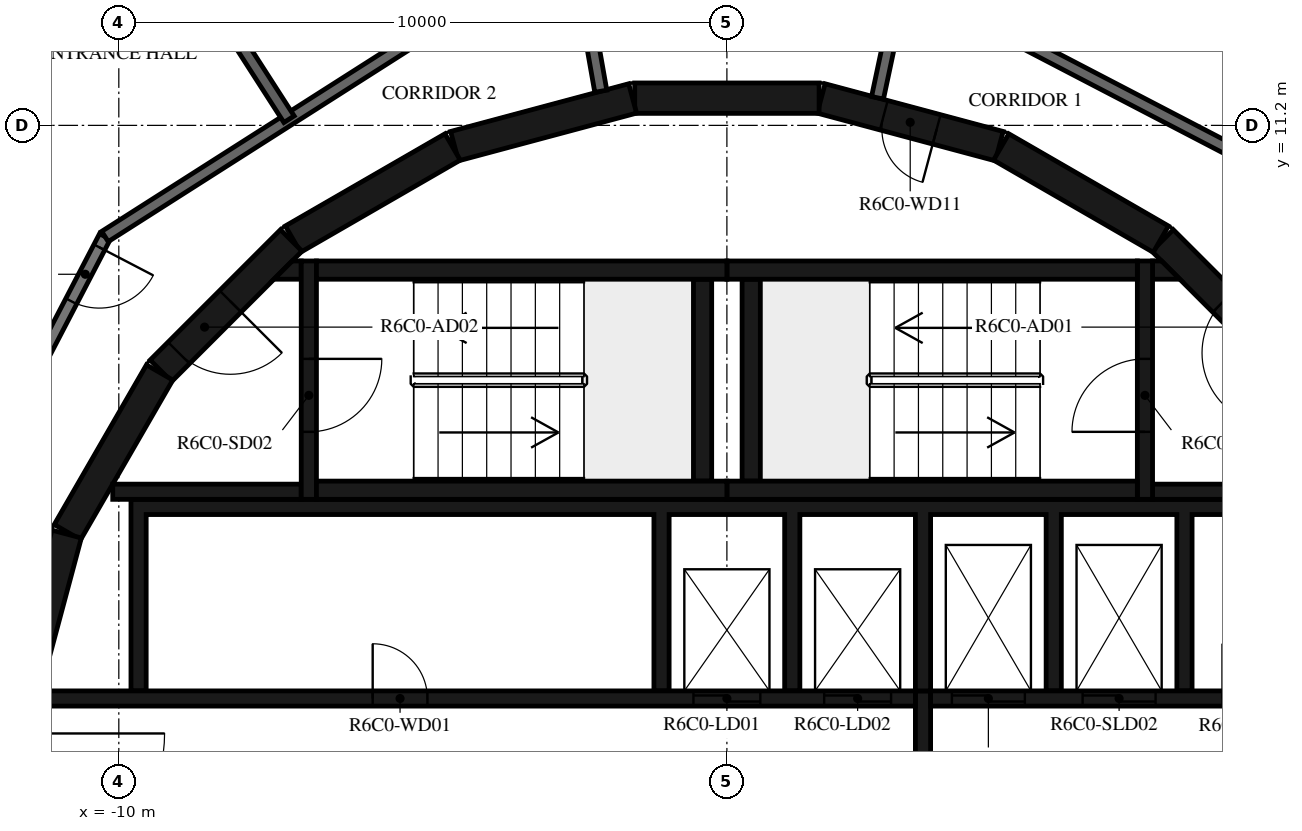
"""IFC4 building model, lengths in metres.
Left out: names, types, materials, properties, quantities, classifications, styles, units other than length and angle.
Written with IfcOpenShell. Run it as: python <this file> out.ifc"""

import sys

from ifc_helpers import new_model, si_unit, direction, frame, frame_2d, origin, place, context, subcontext, project, spatial, polyline, rectangle, outline, extrude, element, fill, save


model = new_model("IFC4")
c1 = context("Model", 3, precision=1e-05, world=origin(), true_north=direction((0.0, 1.0)))
c2 = subcontext(c1, "Body", "Model", "MODEL_VIEW")
j1 = project(units=[si_unit("LENGTHUNIT", "METRE"), si_unit("PLANEANGLEUNIT", "RADIAN")], contexts=[c1])
p1 = place(None, origin())
s1 = spatial("IfcSite", under=j1, at=p1, CompositionType="ELEMENT")
p2 = place(p1, origin())
s2 = spatial("IfcBuilding", under=s1, at=p2, CompositionType="ELEMENT")
p3 = place(p2, frame((0.0, 0.0, 254.7)))
s3 = spatial("IfcBuildingStorey", under=s2, at=p3, CompositionType="ELEMENT", Elevation=254.7)
p4 = place(p3, frame((9.308, 7.164, 0.0), z_axis=(0.0, 0.0, 1.0), x_axis=(-0.707106781187, 0.707106781187, 0.0)))
e1 = element("IfcWall", 1, at=p4, inside=s3, PredefinedType="SHEAR", context=c2, shape_type="SweptSolid", body=[
    extrude(rectangle(XDim=3.032, YDim=0.5, at=frame_2d((1.516, 0.0))), origin(), (0.0, 0.0, 1.0), 3.05),
])
p5 = place(p4, frame((0.416, 0.0, 0.0)))
e2 = element("IfcOpeningElement", 2, at=p5, cuts=e1, PredefinedType="OPENING", context=c2, shape_type="SweptSolid", body=[
    extrude(rectangle(XDim=1.2, YDim=2.1, at=frame_2d((0.6, 1.05))), frame((0.0, 0.26, 0.0), z_axis=(0.0, -1.0, 0.0), x_axis=(1.0, 0.0, 0.0)), (0.0, 0.0, 1.0), 0.52),
])
p6 = place(p3, frame((7.137, 9.329, 0.0), z_axis=(0.0, 0.0, 1.0), x_axis=(-0.865975092491, 0.500087131594, 0.0)))
e3 = element("IfcWall", 3, at=p6, inside=s3, PredefinedType="SHEAR", context=c2, shape_type="SweptSolid", body=[
    extrude(rectangle(XDim=3.033, YDim=0.5, at=frame_2d((1.516, 0.0))), origin(), (0.0, 0.0, 1.0), 3.05),
])
p7 = place(p3, frame((4.479, 10.858, 0.0), z_axis=(0.0, 0.0, 1.0), x_axis=(-0.965948410781, 0.258734743916, 0.0)))
e4 = element("IfcWall", 4, at=p7, inside=s3, PredefinedType="SHEAR", context=c2, shape_type="SweptSolid", body=[
    extrude(rectangle(XDim=3.033, YDim=0.5, at=frame_2d((1.516, 0.0))), origin(), (0.0, 0.0, 1.0), 3.05),
])
p8 = place(p7, frame((1.066, 0.0, 0.0)))
e5 = element("IfcOpeningElement", 5, at=p8, cuts=e4, PredefinedType="OPENING", context=c2, shape_type="SweptSolid", body=[
    extrude(rectangle(XDim=0.9, YDim=2.1, at=frame_2d((0.45, 1.05))), frame((0.0, 0.26, 0.0), z_axis=(0.0, -1.0, 0.0), x_axis=(1.0, 0.0, 0.0)), (0.0, 0.0, 1.0), 0.52),
])
for number, where, z_axis, x_axis in (
    (6, (1.516, 11.647, 0.0), (0.0, 0.0, 1.0), (-1.0, 0.0, 0.0)),
    (7, (-1.55, 11.643, 0.0), (0.0, 0.0, 1.0), (-0.966, -0.259, 0.0)),
    (8, (-4.51, 10.845, 0.0), (0.0, 0.0, 1.0), (-0.866, -0.5, 0.0)),
):
    element("IfcWall", number, at=place(p3, frame(where, z_axis=z_axis, x_axis=x_axis)), inside=s3, PredefinedType="SHEAR", context=c2, shape_type="SweptSolid", body=[
        extrude(rectangle(XDim=3.033, YDim=0.5, at=frame_2d((1.516, 0.0))), origin(), (0.0, 0.0, 1.0), 3.05),
    ])
p9 = place(p3, frame((-7.164, 9.308, 0.0), z_axis=(0.0, 0.0, 1.0), x_axis=(-0.707106781187, -0.707106781187, 0.0)))
e9 = element("IfcWall", 9, at=p9, inside=s3, PredefinedType="SHEAR", context=c2, shape_type="SweptSolid", body=[
    extrude(rectangle(XDim=3.032, YDim=0.5, at=frame_2d((1.516, 0.0))), origin(), (0.0, 0.0, 1.0), 3.05),
])
p10 = place(p9, frame((1.416, 0.0, 0.0)))
e10 = element("IfcOpeningElement", 10, at=p10, cuts=e9, PredefinedType="OPENING", context=c2, shape_type="SweptSolid", body=[
    extrude(rectangle(XDim=1.2, YDim=2.1, at=frame_2d((0.6, 1.05))), frame((0.0, 0.26, 0.0), z_axis=(0.0, -1.0, 0.0), x_axis=(1.0, 0.0, 0.0)), (0.0, 0.0, 1.0), 0.52),
])
for number, where, z_axis, x_axis in (
    (11, (-9.329, 7.137, 0.0), (0.0, 0.0, 1.0), (-0.5, -0.866, 0.0)),
    (12, (-10.858, 4.479, 0.0), (0.0, 0.0, 1.0), (-0.259, -0.966, 0.0)),
):
    element("IfcWall", number, at=place(p3, frame(where, z_axis=z_axis, x_axis=x_axis)), inside=s3, PredefinedType="SHEAR", context=c2, shape_type="SweptSolid", body=[
        extrude(rectangle(XDim=3.033, YDim=0.5, at=frame_2d((1.516, 0.0))), origin(), (0.0, 0.0, 1.0), 3.05),
    ])
for number, where, z_axis, x_axis in (
    (13, (0.0, 5.2, 0.0), (0.0, 0.0, 1.0), (1.0, 0.0, 0.0)),
    (14, (0.0, 8.82, 0.0), (0.0, 0.0, 1.0), (1.0, 0.0, 0.0)),
):
    element("IfcWall", number, at=place(p3, frame(where, z_axis=z_axis, x_axis=x_axis)), inside=s3, PredefinedType="SHEAR", context=c2, shape_type="SweptSolid", body=[
        extrude(rectangle(XDim=6.75, YDim=0.3, at=frame_2d((3.375, 0.0))), origin(), (0.0, 0.0, 1.0), 3.05),
    ])
p11 = place(p3, frame((0.4, 5.35, 0.0), z_axis=(0.0, 0.0, 1.0), x_axis=(0.0, 1.0, 0.0)))
e15 = element("IfcWall", 15, at=p11, inside=s3, PredefinedType="SHEAR", context=c2, shape_type="SweptSolid", body=[
    extrude(rectangle(XDim=3.32, YDim=0.3, at=frame_2d((1.66, 0.0))), origin(), (0.0, 0.0, 1.0), 3.05),
])
p12 = place(p3, frame((6.875, 5.05, 0.0), z_axis=(0.0, 0.0, 1.0), x_axis=(0.0, 1.0, 0.0)))
e16 = element("IfcWall", 16, at=p12, inside=s3, PredefinedType="SHEAR", context=c2, shape_type="SweptSolid", body=[
    extrude(rectangle(XDim=3.92, YDim=0.25, at=frame_2d((1.96, 0.0))), origin(), (0.0, 0.0, 1.0), 3.05),
])
p13 = place(p12, frame((1.11, 0.0, 0.0)))
e17 = element("IfcOpeningElement", 17, at=p13, cuts=e16, PredefinedType="OPENING", context=c2, shape_type="SweptSolid", body=[
    extrude(rectangle(XDim=1.2, YDim=2.1, at=frame_2d((0.6, 1.05))), frame((0.0, 0.135, 0.0), z_axis=(0.0, -1.0, 0.0), x_axis=(1.0, 0.0, 0.0)), (0.0, 0.0, 1.0), 0.27),
])
p14 = place(p3, frame((7.0, 5.175, 0.0), z_axis=(0.0, 0.0, 1.0), x_axis=(1.0, 0.0, 0.0)))
e18 = element("IfcWall", 18, at=p14, inside=s3, PredefinedType="SHEAR", context=c2, shape_type="SweptSolid", body=[
    extrude(rectangle(XDim=3.1, YDim=0.25, at=frame_2d((1.55, 0.0))), origin(), (0.0, 0.0, 1.0), 3.05),
])
p15 = place(p3, origin())
e19 = element("IfcWall", 19, at=p15, inside=s3, PredefinedType="SHEAR", context=c2, shape_type="SweptSolid", body=[
    extrude(outline(polyline([(7.448, 8.67), (7.0, 8.67), (7.0, 8.97), (7.148, 8.97), (7.448, 8.67)])), origin(), (0.0, 0.0, 1.0), 3.05),
])
for number, where, z_axis, x_axis in (
    (20, (-6.75, 5.2, 0.0), (0.0, 0.0, 1.0), (1.0, 0.0, 0.0)),
    (21, (-6.75, 8.82, 0.0), (0.0, 0.0, 1.0), (1.0, 0.0, 0.0)),
):
    element("IfcWall", number, at=place(p3, frame(where, z_axis=z_axis, x_axis=x_axis)), inside=s3, PredefinedType="SHEAR", context=c2, shape_type="SweptSolid", body=[
        extrude(rectangle(XDim=6.75, YDim=0.3, at=frame_2d((3.375, 0.0))), origin(), (0.0, 0.0, 1.0), 3.05),
    ])
p16 = place(p3, frame((-0.4, 5.35, 0.0), z_axis=(0.0, 0.0, 1.0), x_axis=(0.0, 1.0, 0.0)))
e22 = element("IfcWall", 22, at=p16, inside=s3, PredefinedType="SHEAR", context=c2, shape_type="SweptSolid", body=[
    extrude(rectangle(XDim=3.32, YDim=0.3, at=frame_2d((1.66, 0.0))), origin(), (0.0, 0.0, 1.0), 3.05),
])
p17 = place(p3, frame((-6.875, 8.97, 0.0), z_axis=(0.0, 0.0, 1.0), x_axis=(0.0, -1.0, 0.0)))
e23 = element("IfcWall", 23, at=p17, inside=s3, PredefinedType="SHEAR", context=c2, shape_type="SweptSolid", body=[
    extrude(rectangle(XDim=3.92, YDim=0.25, at=frame_2d((1.96, 0.0))), origin(), (0.0, 0.0, 1.0), 3.05),
])
p18 = place(p17, frame((1.61, 0.0, 0.0)))
e24 = element("IfcOpeningElement", 24, at=p18, cuts=e23, PredefinedType="OPENING", context=c2, shape_type="SweptSolid", body=[
    extrude(rectangle(XDim=1.2, YDim=2.1, at=frame_2d((0.6, 1.05))), frame((0.0, 0.135, 0.0), z_axis=(0.0, -1.0, 0.0), x_axis=(1.0, 0.0, 0.0)), (0.0, 0.0, 1.0), 0.27),
])
p19 = place(p3, frame((-7.0, 5.175, 0.0), z_axis=(0.0, 0.0, 1.0), x_axis=(-1.0, 0.0, 0.0)))
e25 = element("IfcWall", 25, at=p19, inside=s3, PredefinedType="SHEAR", context=c2, shape_type="SweptSolid", body=[
    extrude(rectangle(XDim=3.1, YDim=0.25, at=frame_2d((1.55, 0.0))), origin(), (0.0, 0.0, 1.0), 3.05),
])
p20 = place(p3, origin())
e26 = element("IfcWall", 26, at=p20, inside=s3, PredefinedType="SHEAR", context=c2, shape_type="SweptSolid", body=[
    extrude(outline(polyline([(-7.148, 8.97), (-7.0, 8.97), (-7.0, 8.67), (-7.448, 8.67), (-7.148, 8.97)])), origin(), (0.0, 0.0, 1.0), 3.05),
])
p21 = place(p3, origin())
e27 = element("IfcWall", 27, at=p21, inside=s3, PredefinedType="SHEAR", context=c2, shape_type="SweptSolid", body=[
    extrude(outline(polyline([(-9.55, 4.8), (-1.2, 4.8), (-1.2, 1.9), (-0.95, 1.9), (-0.95, 4.8), (0.95, 4.8), (0.95, 1.9), (1.2, 1.9), (1.2, 4.8), (3.1, 4.8), (3.1, 1.9), (3.35, 1.9), (3.35, 4.8), (5.25, 4.8), (5.25, 1.9), (5.5, 1.9), (5.5, 4.8), (7.4, 4.8), (7.4, 1.9), (7.65, 1.9), (7.65, 4.8), (9.55, 4.8), (9.55, 1.9), (9.8, 1.9), (9.8, 4.8), (9.8, 5.05), (-9.8, 5.05), (-9.8, 4.8), (-9.8, 1.9), (-9.55, 1.9), (-9.55, 4.8)])), origin(), (0.0, 0.0, 1.0), 3.05),
])
p22 = place(p3, frame((-11.28, 1.775, 0.0), z_axis=(0.0, 0.0, 1.0), x_axis=(1.0, 0.0, 0.0)))
e28 = element("IfcWall", 28, at=p22, inside=s3, PredefinedType="SHEAR", context=c2, shape_type="SweptSolid", body=[
    extrude(rectangle(XDim=14.38, YDim=0.25, at=frame_2d((7.19, 0.0))), origin(), (0.0, 0.0, 1.0), 3.05),
])
p23 = place(p22, frame((10.73, 0.0, 0.0)))
e29 = element("IfcOpeningElement", 29, at=p23, cuts=e28, PredefinedType="OPENING", context=c2, shape_type="SweptSolid", body=[
    extrude(rectangle(XDim=1.1, YDim=2.1, at=frame_2d((0.55, 1.05))), frame((0.0, 0.135, 0.0), z_axis=(0.0, -1.0, 0.0), x_axis=(1.0, 0.0, 0.0)), (0.0, 0.0, 1.0), 0.27),
])
p24 = place(p22, frame((12.88, 0.0, 0.0)))
e30 = element("IfcOpeningElement", 30, at=p24, cuts=e28, PredefinedType="OPENING", context=c2, shape_type="SweptSolid", body=[
    extrude(rectangle(XDim=1.1, YDim=2.1, at=frame_2d((0.55, 1.05))), frame((0.0, 0.135, 0.0), z_axis=(0.0, -1.0, 0.0), x_axis=(1.0, 0.0, 0.0)), (0.0, 0.0, 1.0), 0.27),
])
p25 = place(p22, frame((5.455, 0.0, 0.0)))
e31 = element("IfcOpeningElement", 31, at=p25, cuts=e28, PredefinedType="OPENING", context=c2, shape_type="SweptSolid", body=[
    extrude(rectangle(XDim=0.9, YDim=2.1, at=frame_2d((0.45, 1.05))), frame((0.0, 0.135, 0.0), z_axis=(0.0, -1.0, 0.0), x_axis=(1.0, 0.0, 0.0)), (0.0, 0.0, 1.0), 0.27),
])
p26 = place(p3, frame((3.35, 1.775, 0.0), z_axis=(0.0, 0.0, 1.0), x_axis=(1.0, 0.0, 0.0)))
e32 = element("IfcWall", 32, at=p26, inside=s3, PredefinedType="SHEAR", context=c2, shape_type="SweptSolid", body=[
    extrude(rectangle(XDim=7.93, YDim=0.25, at=frame_2d((3.965, 0.0))), origin(), (0.0, 0.0, 1.0), 3.05),
])
p27 = place(p26, frame((0.35, 0.0, 0.0)))
e33 = element("IfcOpeningElement", 33, at=p27, cuts=e32, PredefinedType="OPENING", context=c2, shape_type="SweptSolid", body=[
    extrude(rectangle(XDim=1.2, YDim=2.4, at=frame_2d((0.6, 1.2))), frame((0.0, 0.135, 0.0), z_axis=(0.0, -1.0, 0.0), x_axis=(1.0, 0.0, 0.0)), (0.0, 0.0, 1.0), 0.27),
])
p28 = place(p26, frame((2.5, 0.0, 0.0)))
e34 = element("IfcOpeningElement", 34, at=p28, cuts=e32, PredefinedType="OPENING", context=c2, shape_type="SweptSolid", body=[
    extrude(rectangle(XDim=1.2, YDim=2.4, at=frame_2d((0.6, 1.2))), frame((0.0, 0.135, 0.0), z_axis=(0.0, -1.0, 0.0), x_axis=(1.0, 0.0, 0.0)), (0.0, 0.0, 1.0), 0.27),
])
p29 = place(p26, frame((4.8, 0.0, 0.0)))
e35 = element("IfcOpeningElement", 35, at=p29, cuts=e32, PredefinedType="OPENING", context=c2, shape_type="SweptSolid", body=[
    extrude(rectangle(XDim=0.9, YDim=2.1, at=frame_2d((0.45, 1.05))), frame((0.0, 0.135, 0.0), z_axis=(0.0, -1.0, 0.0), x_axis=(1.0, 0.0, 0.0)), (0.0, 0.0, 1.0), 0.27),
])
p30 = place(p3, frame((3.225, -1.9, 0.0), z_axis=(0.0, 0.0, 1.0), x_axis=(0.0, 1.0, 0.0)))
e36 = element("IfcWall", 36, at=p30, inside=s3, PredefinedType="SHEAR", context=c2, shape_type="SweptSolid", body=[
    extrude(rectangle(XDim=3.8, YDim=0.25, at=frame_2d((1.9, 0.0))), origin(), (0.0, 0.0, 1.0), 3.05),
])
p31 = place(p3, frame((9.372, 10.228, 0.0), z_axis=(0.0, 0.0, 1.0), x_axis=(-0.887005184532, 0.461759464021, 0.0)))
e37 = element("IfcWall", 37, at=p31, inside=s3, PredefinedType="STANDARD", context=c2, shape_type="SweptSolid", body=[
    extrude(rectangle(XDim=7.181, YDim=0.2, at=frame_2d((3.591, 0.0))), origin(), (0.0, 0.0, 1.0), 3.05),
])
p32 = place(p3, frame((2.878, 13.538, 0.0), z_axis=(0.0, 0.0, 1.0), x_axis=(-0.207893604596, -0.978151444904, 0.0)))
e38 = element("IfcWall", 38, at=p32, inside=s3, PredefinedType="STANDARD", context=c2, shape_type="SweptSolid", body=[
    extrude(rectangle(XDim=1.927, YDim=0.2, at=frame_2d((0.963, 0.0))), origin(), (0.0, 0.0, 1.0), 3.05),
])
p33 = place(p3, frame((-10.228, 9.372, 0.0), z_axis=(0.0, 0.0, 1.0), x_axis=(-0.461759464021, -0.887005184532, 0.0)))
e39 = element("IfcWall", 39, at=p33, inside=s3, PredefinedType="STANDARD", context=c2, shape_type="SweptSolid", body=[
    extrude(rectangle(XDim=7.181, YDim=0.2, at=frame_2d((3.591, 0.0))), origin(), (0.0, 0.0, 1.0), 3.05),
])
p34 = place(p33, frame((0.2, 0.0, 0.0)))
e40 = element("IfcOpeningElement", 40, at=p34, cuts=e39, PredefinedType="OPENING", context=c2, shape_type="SweptSolid", body=[
    extrude(rectangle(XDim=1.0, YDim=2.1, at=frame_2d((0.5, 1.05))), frame((0.0, 0.11, 0.0), z_axis=(0.0, -1.0, 0.0), x_axis=(1.0, 0.0, 0.0)), (0.0, 0.0, 1.0), 0.22),
])
p35 = place(p3, frame((-2.074, 11.761, 0.0), z_axis=(0.0, 0.0, 1.0), x_axis=(-0.173679082312, 0.984802303189, 0.0)))
e41 = element("IfcWall", 41, at=p35, inside=s3, PredefinedType="STANDARD", context=c2, shape_type="SweptSolid", body=[
    extrude(rectangle(XDim=1.573, YDim=0.2, at=frame_2d((0.787, 0.0))), origin(), (0.0, 0.0, 1.0), 3.05),
])
p36 = place(p3, frame((-4.172, 13.231, 0.0), z_axis=(0.0, 0.0, 1.0), x_axis=(-0.843388394728, -0.537304397561, 0.0)))
e42 = element("IfcWall", 42, at=p36, inside=s3, PredefinedType="STANDARD", context=c2, shape_type="SweptSolid", body=[
    extrude(rectangle(XDim=7.181, YDim=0.2, at=frame_2d((3.59, 0.0))), origin(), (0.0, 0.0, 1.0), 3.05),
])
p37 = place(p3, frame((-9.69, 15.171, 0.0), z_axis=(0.0, 0.0, 1.0), x_axis=(0.540961372678, -0.841047438181, 0.0)))
e43 = element("IfcWall", 43, at=p37, inside=s3, PredefinedType="STANDARD", context=c2, shape_type="SweptSolid", body=[
    extrude(rectangle(XDim=4.602, YDim=0.2, at=frame_2d((2.301, 0.0))), origin(), (0.0, 0.0, 1.0), 3.05),
])
p38 = place(p3, frame((10.421, 11.373, 0.0), z_axis=(0.0, 0.0, 1.0), x_axis=(-0.887012970857, 0.461744506769, 0.0)))
e44 = element("IfcWall", 44, at=p38, inside=s3, PredefinedType="PARTITIONING", context=c2, shape_type="SweptSolid", body=[
    extrude(rectangle(XDim=7.985, YDim=0.12, at=frame_2d((3.992, 0.0))), origin(), (0.0, 0.0, 1.0), 3.05),
])
p39 = place(p38, frame((5.448, 0.0, 0.0)))
e45 = element("IfcOpeningElement", 45, at=p39, cuts=e44, PredefinedType="OPENING", context=c2, shape_type="SweptSolid", body=[
    extrude(rectangle(XDim=0.9, YDim=2.1, at=frame_2d((0.45, 1.05))), frame((0.0, 0.07, 0.0), z_axis=(0.0, -1.0, 0.0), x_axis=(1.0, 0.0, 0.0)), (0.0, 0.0, 1.0), 0.14),
])
p40 = place(p13, origin())
e46 = element("IfcDoor", 46, at=p40, inside=s3, OperationType="SINGLE_SWING_LEFT", PredefinedType="DOOR", context=c2, shape_type="SweptSolid", body=[
    extrude(rectangle(XDim=1.2, YDim=2.1, at=frame_2d((0.6, 1.05))), frame((0.0, 0.025, 0.0), z_axis=(0.0, -1.0, 0.0), x_axis=(1.0, 0.0, 0.0)), (0.0, 0.0, 1.0), 0.05),
])
fill(e17, e46)
p41 = place(p5, origin())
e47 = element("IfcDoor", 47, at=p41, inside=s3, OperationType="SINGLE_SWING_RIGHT", PredefinedType="DOOR", context=c2, shape_type="SweptSolid", body=[
    extrude(rectangle(XDim=1.2, YDim=2.1, at=frame_2d((0.6, 1.05))), frame((0.0, 0.025, 0.0), z_axis=(0.0, -1.0, 0.0), x_axis=(1.0, 0.0, 0.0)), (0.0, 0.0, 1.0), 0.05),
])
fill(e2, e47)
p42 = place(p18, origin())
e48 = element("IfcDoor", 48, at=p42, inside=s3, OperationType="SINGLE_SWING_LEFT", PredefinedType="DOOR", context=c2, shape_type="SweptSolid", body=[
    extrude(rectangle(XDim=1.2, YDim=2.1, at=frame_2d((0.6, 1.05))), frame((0.0, 0.025, 0.0), z_axis=(0.0, -1.0, 0.0), x_axis=(1.0, 0.0, 0.0)), (0.0, 0.0, 1.0), 0.05),
])
fill(e24, e48)
p43 = place(p10, origin())
e49 = element("IfcDoor", 49, at=p43, inside=s3, OperationType="SINGLE_SWING_RIGHT", PredefinedType="DOOR", context=c2, shape_type="SweptSolid", body=[
    extrude(rectangle(XDim=1.2, YDim=2.1, at=frame_2d((0.6, 1.05))), frame((0.0, 0.025, 0.0), z_axis=(0.0, -1.0, 0.0), x_axis=(1.0, 0.0, 0.0)), (0.0, 0.0, 1.0), 0.05),
])
fill(e10, e49)
p44 = place(p23, origin())
e50 = element("IfcDoor", 50, at=p44, inside=s3, OperationType="DOUBLE_DOOR_SLIDING", PredefinedType="DOOR", context=c2, shape_type="SweptSolid", body=[
    extrude(rectangle(XDim=1.1, YDim=2.1, at=frame_2d((0.55, 1.05))), frame((0.0, 0.025, 0.0), z_axis=(0.0, -1.0, 0.0), x_axis=(1.0, 0.0, 0.0)), (0.0, 0.0, 1.0), 0.05),
])
fill(e29, e50)
p45 = place(p24, origin())
e51 = element("IfcDoor", 51, at=p45, inside=s3, OperationType="DOUBLE_DOOR_SLIDING", PredefinedType="DOOR", context=c2, shape_type="SweptSolid", body=[
    extrude(rectangle(XDim=1.1, YDim=2.1, at=frame_2d((0.55, 1.05))), frame((0.0, 0.025, 0.0), z_axis=(0.0, -1.0, 0.0), x_axis=(1.0, 0.0, 0.0)), (0.0, 0.0, 1.0), 0.05),
])
fill(e30, e51)
p46 = place(p27, origin())
e52 = element("IfcDoor", 52, at=p46, inside=s3, OperationType="DOUBLE_DOOR_SLIDING", PredefinedType="DOOR", context=c2, shape_type="SweptSolid", body=[
    extrude(rectangle(XDim=1.2, YDim=2.4, at=frame_2d((0.6, 1.2))), frame((0.0, 0.025, 0.0), z_axis=(0.0, -1.0, 0.0), x_axis=(1.0, 0.0, 0.0)), (0.0, 0.0, 1.0), 0.05),
])
fill(e33, e52)
p47 = place(p28, origin())
e53 = element("IfcDoor", 53, at=p47, inside=s3, OperationType="DOUBLE_DOOR_SLIDING", PredefinedType="DOOR", context=c2, shape_type="SweptSolid", body=[
    extrude(rectangle(XDim=1.2, YDim=2.4, at=frame_2d((0.6, 1.2))), frame((0.0, 0.025, 0.0), z_axis=(0.0, -1.0, 0.0), x_axis=(1.0, 0.0, 0.0)), (0.0, 0.0, 1.0), 0.05),
])
fill(e34, e53)
p48 = place(p25, origin())
e54 = element("IfcDoor", 54, at=p48, inside=s3, OperationType="SINGLE_SWING_LEFT", PredefinedType="DOOR", context=c2, shape_type="SweptSolid", body=[
    extrude(rectangle(XDim=0.9, YDim=2.1, at=frame_2d((0.45, 1.05))), frame((0.0, 0.025, 0.0), z_axis=(0.0, -1.0, 0.0), x_axis=(1.0, 0.0, 0.0)), (0.0, 0.0, 1.0), 0.05),
])
fill(e31, e54)
p49 = place(p8, origin())
e55 = element("IfcDoor", 55, at=p49, inside=s3, OperationType="SINGLE_SWING_LEFT", PredefinedType="DOOR", context=c2, shape_type="SweptSolid", body=[
    extrude(rectangle(XDim=0.9, YDim=2.1, at=frame_2d((0.45, 1.05))), frame((0.0, 0.025, 0.0), z_axis=(0.0, -1.0, 0.0), x_axis=(1.0, 0.0, 0.0)), (0.0, 0.0, 1.0), 0.05),
])
fill(e5, e55)
p50 = place(p34, origin())
e56 = element("IfcDoor", 56, at=p50, inside=s3, OperationType="SINGLE_SWING_LEFT", PredefinedType="DOOR", context=c2, shape_type="SweptSolid", body=[
    extrude(rectangle(XDim=1.0, YDim=2.1, at=frame_2d((0.5, 1.05))), frame((0.0, 0.025, 0.0), z_axis=(0.0, -1.0, 0.0), x_axis=(1.0, 0.0, 0.0)), (0.0, 0.0, 1.0), 0.05),
])
fill(e40, e56)
save(model, sys.argv[1])
